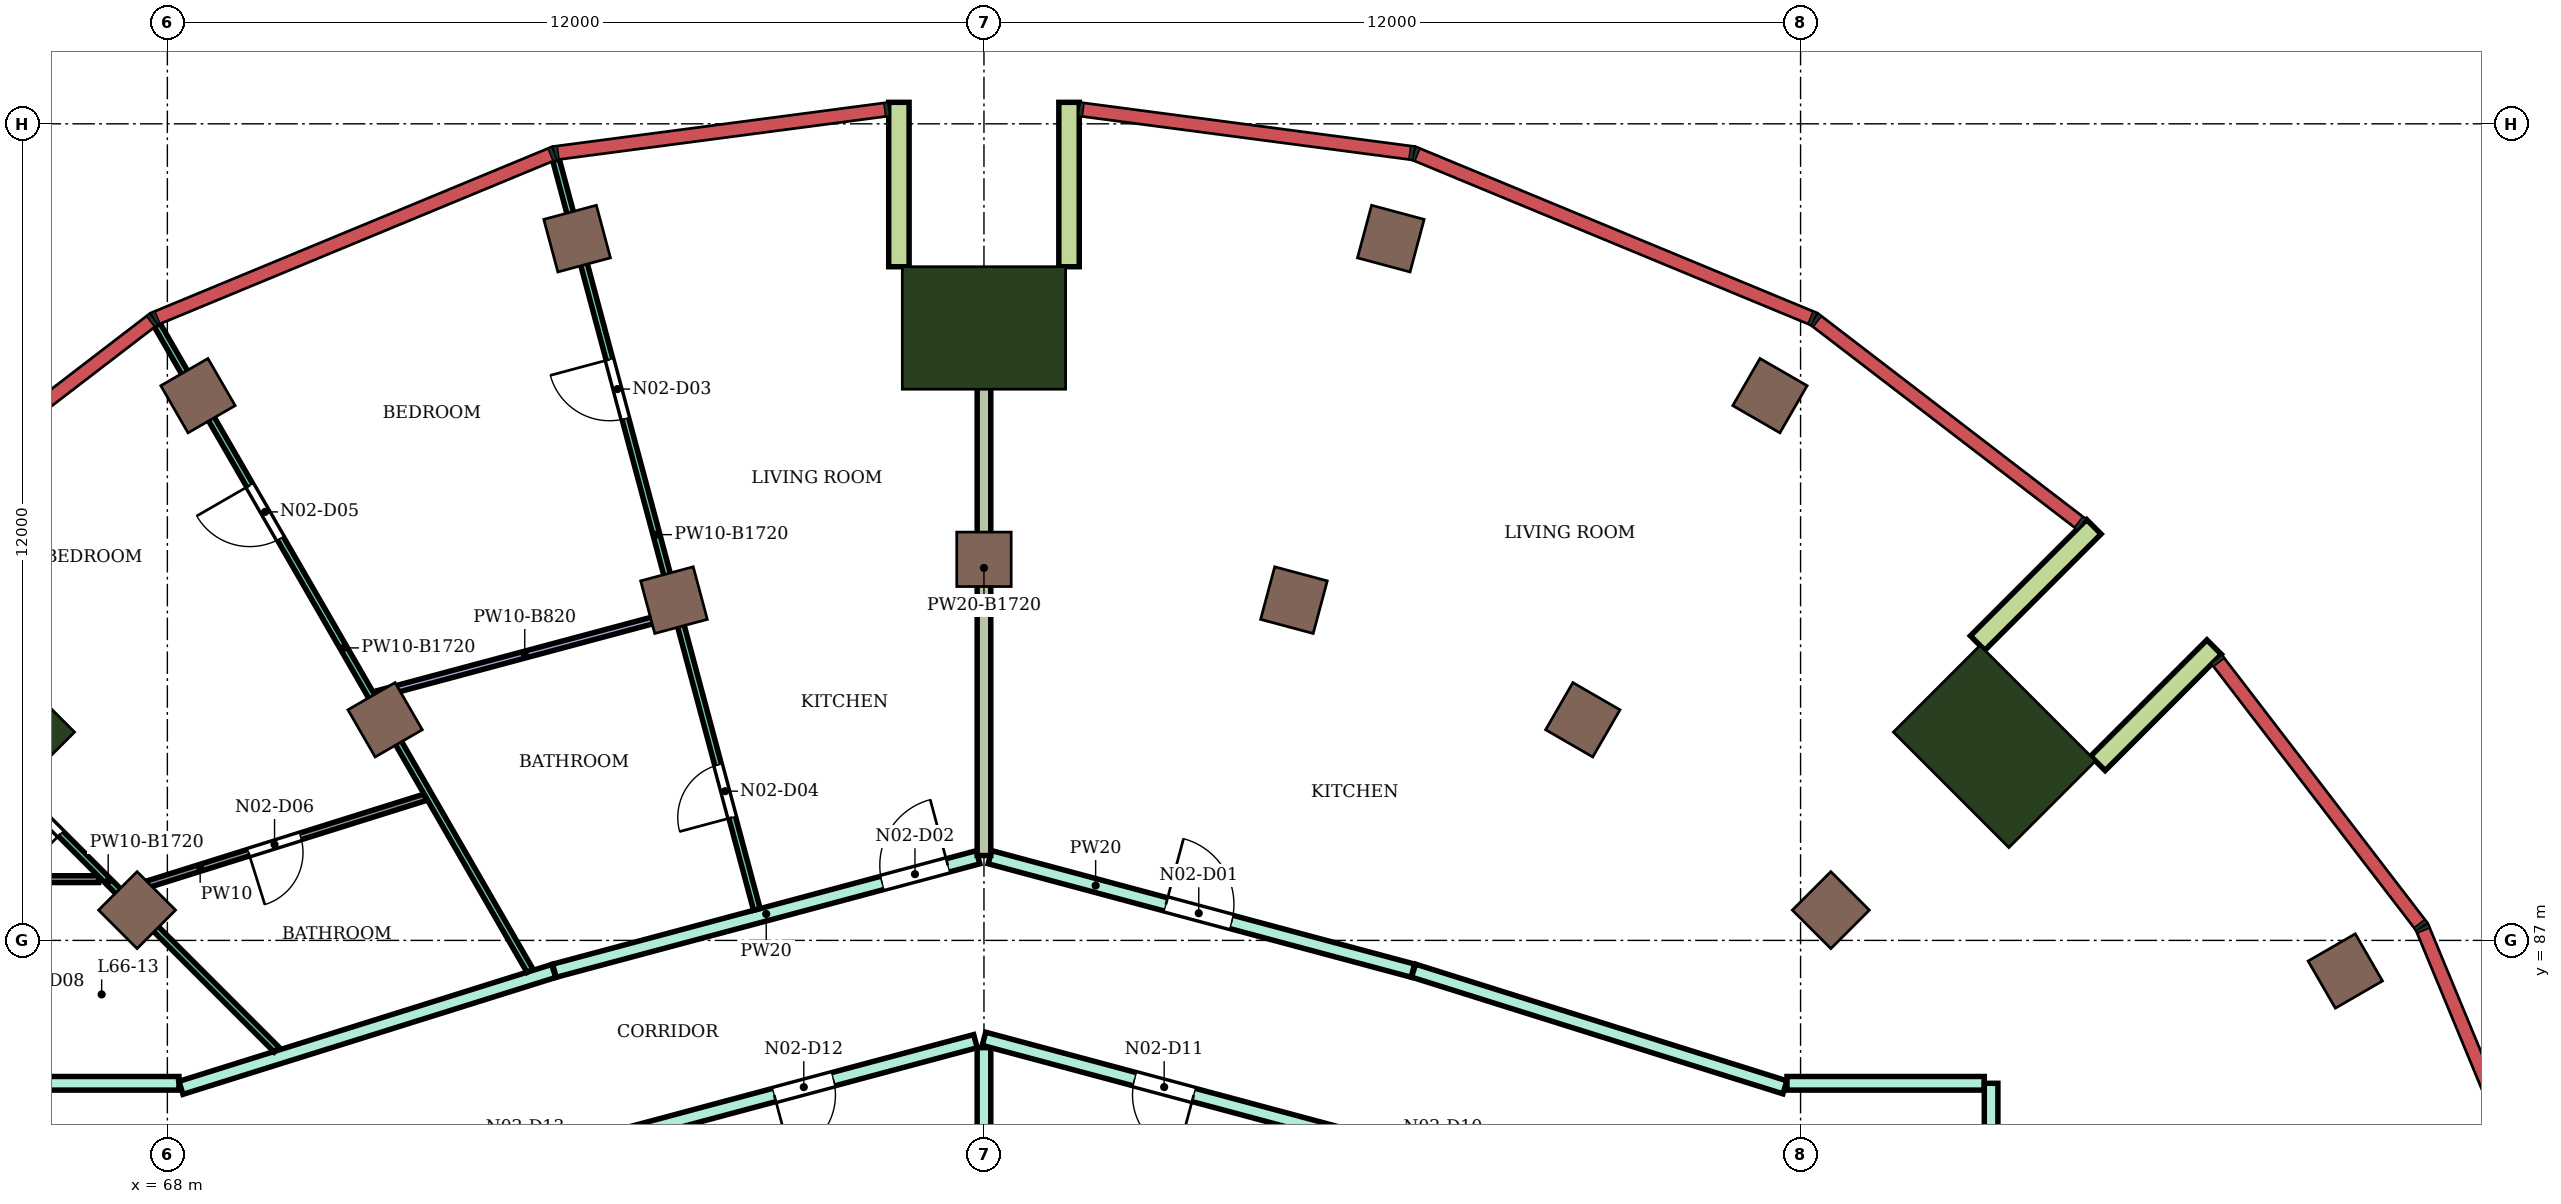
"""IFC4 building model, lengths in metres.
Left out: names, types, materials, properties, quantities, classifications, styles, units other than length and angle.
Written with IfcOpenShell. Run it as: python <this file> out.ifc"""

import sys

from ifc_helpers import new_model, si_unit, direction, frame, frame_2d, origin, origin_2d, place, context, subcontext, project, spatial, rectangle, extrude, element, fill, save


model = new_model("IFC4")
c1 = context("Model", 3, precision=1e-05, world=origin(), true_north=direction((0.0, 1.0)))
c2 = subcontext(c1, "Body", "Model", "MODEL_VIEW")
j1 = project(units=[si_unit("LENGTHUNIT", "METRE"), si_unit("PLANEANGLEUNIT", "RADIAN")], contexts=[c1])
p1 = place(None, origin())
s1 = spatial("IfcSite", under=j1, at=p1, CompositionType="ELEMENT")
p2 = place(p1, origin())
s2 = spatial("IfcBuilding", under=s1, at=p2, CompositionType="ELEMENT")
p3 = place(p2, frame((0.0, 0.0, 288.3)))
s3 = spatial("IfcBuildingStorey", under=s2, at=p3, CompositionType="ELEMENT", Elevation=288.3)
for number, where, z_axis, x_axis in (
    (1, (100.005, 86.55, 0.0), (0.0, 0.0, 1.0), (0.866, 0.5, 0.0)),
    (2, (91.55, 95.005, 0.0), (0.0, 0.0, 1.0), (0.5, 0.866, 0.0)),
    (3, (85.979, 97.313, 0.0), (0.0, 0.0, 1.0), (0.259, 0.966, 0.0)),
    (4, (74.021, 97.313, 0.0), (0.0, 0.0, 1.0), (-0.259, 0.966, 0.0)),
    (5, (68.45, 95.005, 0.0), (0.0, 0.0, 1.0), (-0.5, 0.866, 0.0)),
    (6, (92.445, 87.445, 0.0), (0.0, 0.0, 1.0), (0.707, 0.707, 0.0)),
    (7, (88.8, 90.242, 0.0), (0.0, 0.0, 1.0), (0.5, 0.866, 0.0)),
    (8, (84.555, 92.0, 0.0), (0.0, 0.0, 1.0), (0.259, 0.966, 0.0)),
    (9, (80.0, 92.6, 0.0), (0.0, 0.0, 1.0), (0.0, 1.0, 0.0)),
    (10, (75.445, 92.0, 0.0), (0.0, 0.0, 1.0), (-0.259, 0.966, 0.0)),
    (11, (71.2, 90.242, 0.0), (0.0, 0.0, 1.0), (-0.5, 0.866, 0.0)),
    (12, (67.555, 87.445, 0.0), (0.0, 0.0, 1.0), (-0.707, 0.707, 0.0)),
):
    element("IfcColumn", number, at=place(p3, frame(where, z_axis=z_axis, x_axis=x_axis)), inside=s3, PredefinedType="COLUMN", context=c2, shape_type="SweptSolid", body=[
        extrude(rectangle(XDim=0.8, YDim=0.8, at=origin_2d()), origin(), (0.0, 0.0, 1.0), 4.2),
    ])
for number, where, z_axis, x_axis in (
    (13, (94.849, 89.849, 0.0), (0.0, 0.0, 1.0), (0.707, 0.707, 0.0)),
    (14, (80.0, 96.0, 0.0), (0.0, 0.0, 1.0), (0.0, 1.0, 0.0)),
    (15, (65.151, 89.849, 0.0), (0.0, 0.0, 1.0), (-0.707, 0.707, 0.0)),
):
    element("IfcColumn", number, at=place(p3, frame(where, z_axis=z_axis, x_axis=x_axis)), inside=s3, PredefinedType="COLUMN", context=c2, shape_type="SweptSolid", body=[
        extrude(rectangle(XDim=1.8, YDim=2.4, at=origin_2d()), origin(), (0.0, 0.0, 1.0), 4.2),
    ])
for number, where, z_axis, x_axis in (
    (16, (96.37, 89.602, 0.0), (0.0, 0.0, 1.0), (0.707, 0.707, 0.0)),
    (17, (94.602, 91.37, 0.0), (0.0, 0.0, 1.0), (0.707, 0.707, 0.0)),
):
    element("IfcWall", number, at=place(p3, frame(where, z_axis=z_axis, x_axis=x_axis)), inside=s3, PredefinedType="NOTDEFINED", context=c2, shape_type="SweptSolid", body=[
        extrude(rectangle(XDim=2.416, YDim=0.3, at=frame_2d((1.208, 0.0))), origin(), (0.0, 0.0, 1.0), 4.2),
    ])
for number, where, z_axis, x_axis in (
    (18, (81.25, 96.9, 0.0), (0.0, 0.0, 1.0), (0.0, 1.0, 0.0)),
    (19, (78.75, 96.9, 0.0), (0.0, 0.0, 1.0), (0.0, 1.0, 0.0)),
):
    element("IfcWall", number, at=place(p3, frame(where, z_axis=z_axis, x_axis=x_axis)), inside=s3, PredefinedType="NOTDEFINED", context=c2, shape_type="SweptSolid", body=[
        extrude(rectangle(XDim=2.416, YDim=0.3, at=frame_2d((1.208, 0.0))), origin(), (0.0, 0.0, 1.0), 4.2),
    ])
p4 = place(p3, frame((65.2, 84.9, 0.0), z_axis=(0.0, 0.0, 1.0), x_axis=(1.0, 0.0, 0.0)))
e20 = element("IfcWall", 20, at=p4, inside=s3, PredefinedType="PARTITIONING", context=c2, shape_type="SweptSolid", body=[
    extrude(rectangle(XDim=2.97, YDim=0.2, at=frame_2d((1.485, 0.0))), origin(), (0.0, 0.0, 1.0), 3.75),
])
p5 = place(p3, frame((68.2, 84.833, 0.0), z_axis=(0.0, 0.0, 1.0), x_axis=(0.954191968402, 0.299195065863, 0.0)))
e21 = element("IfcWall", 21, at=p5, inside=s3, PredefinedType="PARTITIONING", context=c2, shape_type="SweptSolid", body=[
    extrude(rectangle(XDim=5.74, YDim=0.2, at=frame_2d((2.87, 0.0))), origin(), (0.0, 0.0, 1.0), 3.75),
])
p6 = place(p3, frame((73.687, 86.554, 0.0), z_axis=(0.0, 0.0, 1.0), x_axis=(0.96595903825, 0.258695064551, 0.0)))
e22 = element("IfcWall", 22, at=p6, inside=s3, PredefinedType="PARTITIONING", context=c2, shape_type="SweptSolid", body=[
    extrude(rectangle(XDim=6.446, YDim=0.2, at=frame_2d((3.223, 0.0))), origin(), (0.0, 0.0, 1.0), 3.75),
])
p7 = place(p6, frame((4.986, 0.0, 0.0)))
e23 = element("IfcOpeningElement", 23, at=p7, cuts=e22, PredefinedType="OPENING", context=c2, shape_type="SweptSolid", body=[
    extrude(rectangle(XDim=1.0, YDim=2.1, at=frame_2d((0.5, 1.05))), frame((0.0, 0.11, 0.0), z_axis=(0.0, -1.0, 0.0), x_axis=(1.0, 0.0, 0.0)), (0.0, 0.0, 1.0), 0.22),
])
p8 = place(p3, frame((74.413, 84.057, 0.0), z_axis=(0.0, 0.0, 1.0), x_axis=(0.965972135939, 0.258646153246, 0.0)))
e24 = element("IfcWall", 24, at=p8, inside=s3, PredefinedType="PARTITIONING", context=c2, shape_type="SweptSolid", body=[
    extrude(rectangle(XDim=5.654, YDim=0.2, at=frame_2d((2.827, 0.0))), origin(), (0.0, 0.0, 1.0), 3.75),
])
p9 = place(p8, frame((2.593, 0.0, 0.0)))
e25 = element("IfcOpeningElement", 25, at=p9, cuts=e24, PredefinedType="OPENING", context=c2, shape_type="SweptSolid", body=[
    extrude(rectangle(XDim=0.9, YDim=2.1, at=frame_2d((0.45, 1.05))), frame((0.0, 0.11, 0.0), z_axis=(0.0, -1.0, 0.0), x_axis=(1.0, 0.0, 0.0)), (0.0, 0.0, 1.0), 0.22),
])
p10 = place(p3, frame((80.0, 82.699, 0.0), z_axis=(0.0, 0.0, 1.0), x_axis=(0.0, 1.0, 0.0)))
e26 = element("IfcWall", 26, at=p10, inside=s3, PredefinedType="PARTITIONING", context=c2, shape_type="SweptSolid", body=[
    extrude(rectangle(XDim=2.725, YDim=0.2, at=frame_2d((1.363, 0.0))), origin(), (0.0, 0.0, 1.0), 3.75),
])
p11 = place(p3, frame((80.0, 85.554, 0.0), z_axis=(0.0, 0.0, 1.0), x_axis=(0.965928989968, -0.258807237802, 0.0)))
e27 = element("IfcWall", 27, at=p11, inside=s3, PredefinedType="PARTITIONING", context=c2, shape_type="SweptSolid", body=[
    extrude(rectangle(XDim=5.774, YDim=0.2, at=frame_2d((2.887, 0.0))), origin(), (0.0, 0.0, 1.0), 3.75),
])
p12 = place(p11, frame((2.292, 0.0, 0.0)))
e28 = element("IfcOpeningElement", 28, at=p12, cuts=e27, PredefinedType="OPENING", context=c2, shape_type="SweptSolid", body=[
    extrude(rectangle(XDim=0.9, YDim=2.1, at=frame_2d((0.45, 1.05))), frame((0.0, 0.11, 0.0), z_axis=(0.0, -1.0, 0.0), x_axis=(1.0, 0.0, 0.0)), (0.0, 0.0, 1.0), 0.22),
])
p13 = place(p3, frame((80.087, 88.223, 0.0), z_axis=(0.0, 0.0, 1.0), x_axis=(0.965852330757, -0.25909317855, 0.0)))
e29 = element("IfcWall", 29, at=p13, inside=s3, PredefinedType="PARTITIONING", context=c2, shape_type="SweptSolid", body=[
    extrude(rectangle(XDim=6.436, YDim=0.2, at=frame_2d((3.218, 0.0))), origin(), (0.0, 0.0, 1.0), 3.75),
])
p14 = place(p13, frame((2.678, 0.0, 0.0)))
e30 = element("IfcOpeningElement", 30, at=p14, cuts=e29, PredefinedType="OPENING", context=c2, shape_type="SweptSolid", body=[
    extrude(rectangle(XDim=1.0, YDim=2.1, at=frame_2d((0.5, 1.05))), frame((0.0, 0.11, 0.0), z_axis=(0.0, -1.0, 0.0), x_axis=(1.0, 0.0, 0.0)), (0.0, 0.0, 1.0), 0.22),
])
p15 = place(p3, frame((80.0, 88.247, 0.0), z_axis=(0.0, 0.0, 1.0), x_axis=(0.0, 1.0, 0.0)))
e31 = element("IfcWall", 31, at=p15, inside=s3, PredefinedType="PARTITIONING", context=c2, shape_type="SweptSolid", body=[
    extrude(rectangle(XDim=8.452, YDim=0.2, at=frame_2d((4.226, 0.0))), origin(), (0.0, 0.0, 1.0), 2.48),
])
p16 = place(p3, frame((86.313, 86.555, 0.0), z_axis=(0.0, 0.0, 1.0), x_axis=(0.9540216201, -0.299737799389, 0.0)))
e32 = element("IfcWall", 32, at=p16, inside=s3, PredefinedType="PARTITIONING", context=c2, shape_type="SweptSolid", body=[
    extrude(rectangle(XDim=5.719, YDim=0.2, at=frame_2d((2.86, 0.0))), origin(), (0.0, 0.0, 1.0), 3.75),
])
p17 = place(p3, frame((91.8, 84.9, 0.0), z_axis=(0.0, 0.0, 1.0), x_axis=(1.0, 0.0, 0.0)))
e33 = element("IfcWall", 33, at=p17, inside=s3, PredefinedType="PARTITIONING", context=c2, shape_type="SweptSolid", body=[
    extrude(rectangle(XDim=2.9, YDim=0.2, at=frame_2d((1.45, 0.0))), origin(), (0.0, 0.0, 1.0), 3.75),
])
p18 = place(p3, frame((94.8, 83.577, 0.0), z_axis=(0.0, 0.0, 1.0), x_axis=(0.0, 1.0, 0.0)))
e34 = element("IfcWall", 34, at=p18, inside=s3, PredefinedType="PARTITIONING", context=c2, shape_type="SweptSolid", body=[
    extrude(rectangle(XDim=1.323, YDim=0.2, at=frame_2d((0.662, 0.0))), origin(), (0.0, 0.0, 1.0), 3.75),
])
p19 = place(p3, frame((59.486, 87.9, 0.0), z_axis=(0.0, 0.0, 1.0), x_axis=(1.0, 0.0, 0.0)))
e35 = element("IfcWall", 35, at=p19, inside=s3, PredefinedType="PARTITIONING", context=c2, shape_type="SweptSolid", body=[
    extrude(rectangle(XDim=7.504, YDim=0.1, at=frame_2d((3.752, 0.0))), origin(), (0.0, 0.0, 1.0), 3.75),
])
p20 = place(p19, frame((2.622, 0.0, 0.0)))
e36 = element("IfcOpeningElement", 36, at=p20, cuts=e35, PredefinedType="OPENING", context=c2, shape_type="SweptSolid", body=[
    extrude(rectangle(XDim=0.8, YDim=2.1, at=frame_2d((0.4, 1.05))), frame((0.0, 0.06, 0.0), z_axis=(0.0, -1.0, 0.0), x_axis=(1.0, 0.0, 0.0)), (0.0, 0.0, 1.0), 0.12),
])
p21 = place(p3, frame((64.656, 90.344, 0.0), z_axis=(0.0, 0.0, 1.0), x_axis=(0.707106781187, -0.707106781187, 0.0)))
e37 = element("IfcWall", 37, at=p21, inside=s3, PredefinedType="PARTITIONING", context=c2, shape_type="SweptSolid", body=[
    extrude(rectangle(XDim=7.0, YDim=0.1, at=frame_2d((3.5, 0.0))), origin(), (0.0, 0.0, 1.0), 2.48),
])
p22 = place(p21, frame((1.613, 0.0, 0.0)))
e38 = element("IfcOpeningElement", 38, at=p22, cuts=e37, PredefinedType="OPENING", context=c2, shape_type="SweptSolid", body=[
    extrude(rectangle(XDim=0.9, YDim=2.1, at=frame_2d((0.45, 1.05))), frame((0.0, 0.06, 0.0), z_axis=(0.0, -1.0, 0.0), x_axis=(1.0, 0.0, 0.0)), (0.0, 0.0, 1.0), 0.12),
])
p23 = place(p3, frame((67.379, 87.721, 0.0), z_axis=(0.0, 0.0, 1.0), x_axis=(0.954243762736, 0.299029833426, 0.0)))
e39 = element("IfcWall", 39, at=p23, inside=s3, PredefinedType="PARTITIONING", context=c2, shape_type="SweptSolid", body=[
    extrude(rectangle(XDim=4.622, YDim=0.1, at=frame_2d((2.311, 0.0))), origin(), (0.0, 0.0, 1.0), 3.75),
])
p24 = place(p23, frame((1.901, 0.0, 0.0)))
e40 = element("IfcOpeningElement", 40, at=p24, cuts=e39, PredefinedType="OPENING", context=c2, shape_type="SweptSolid", body=[
    extrude(rectangle(XDim=0.8, YDim=2.1, at=frame_2d((0.4, 1.05))), frame((0.0, 0.06, 0.0), z_axis=(0.0, -1.0, 0.0), x_axis=(1.0, 0.0, 0.0)), (0.0, 0.0, 1.0), 0.12),
])
p25 = place(p3, frame((67.851, 96.042, 0.0), z_axis=(0.0, 0.0, 1.0), x_axis=(0.499990581918, -0.866030841248, 0.0)))
e41 = element("IfcWall", 41, at=p25, inside=s3, PredefinedType="PARTITIONING", context=c2, shape_type="SweptSolid", body=[
    extrude(rectangle(XDim=10.956, YDim=0.1, at=frame_2d((5.478, 0.0))), origin(), (0.0, 0.0, 1.0), 2.48),
])
p26 = place(p25, frame((2.72, 0.0, 0.0)))
e42 = element("IfcOpeningElement", 42, at=p26, cuts=e41, PredefinedType="OPENING", context=c2, shape_type="SweptSolid", body=[
    extrude(rectangle(XDim=0.9, YDim=2.1, at=frame_2d((0.45, 1.05))), frame((0.0, 0.06, 0.0), z_axis=(0.0, -1.0, 0.0), x_axis=(1.0, 0.0, 0.0)), (0.0, 0.0, 1.0), 0.12),
])
p27 = place(p3, frame((71.054, 90.611, 0.0), z_axis=(0.0, 0.0, 1.0), x_axis=(0.965944938819, 0.258747705633, 0.0)))
e43 = element("IfcWall", 43, at=p27, inside=s3, PredefinedType="PARTITIONING", context=c2, shape_type="SweptSolid", body=[
    extrude(rectangle(XDim=4.551, YDim=0.1, at=frame_2d((2.275, 0.0))), origin(), (0.0, 0.0, 1.0), 3.38),
])
p28 = place(p3, frame((73.711, 98.47, 0.0), z_axis=(0.0, 0.0, 1.0), x_axis=(0.258792445142, -0.965932953335, 0.0)))
e44 = element("IfcWall", 44, at=p28, inside=s3, PredefinedType="PARTITIONING", context=c2, shape_type="SweptSolid", body=[
    extrude(rectangle(XDim=11.404, YDim=0.1, at=frame_2d((5.702, 0.0))), origin(), (0.0, 0.0, 1.0), 2.48),
])
p29 = place(p28, frame((3.037, 0.0, 0.0)))
e45 = element("IfcOpeningElement", 45, at=p29, cuts=e44, PredefinedType="OPENING", context=c2, shape_type="SweptSolid", body=[
    extrude(rectangle(XDim=0.9, YDim=2.1, at=frame_2d((0.45, 1.05))), frame((0.0, 0.06, 0.0), z_axis=(0.0, -1.0, 0.0), x_axis=(1.0, 0.0, 0.0)), (0.0, 0.0, 1.0), 0.12),
])
p30 = place(p28, frame((9.205, 0.0, 0.0)))
e46 = element("IfcOpeningElement", 46, at=p30, cuts=e44, PredefinedType="OPENING", context=c2, shape_type="SweptSolid", body=[
    extrude(rectangle(XDim=0.8, YDim=2.1, at=frame_2d((0.4, 1.05))), frame((0.0, 0.06, 0.0), z_axis=(0.0, -1.0, 0.0), x_axis=(1.0, 0.0, 0.0)), (0.0, 0.0, 1.0), 0.12),
])
p31 = place(p14, origin())
e47 = element("IfcDoor", 47, at=p31, inside=s3, OperationType="SINGLE_SWING_LEFT", PredefinedType="DOOR", context=c2, shape_type="SweptSolid", body=[
    extrude(rectangle(XDim=1.0, YDim=2.1, at=frame_2d((0.5, 1.05))), frame((0.0, 0.025, 0.0), z_axis=(0.0, -1.0, 0.0), x_axis=(1.0, 0.0, 0.0)), (0.0, 0.0, 1.0), 0.05),
])
fill(e30, e47)
p32 = place(p7, origin())
e48 = element("IfcDoor", 48, at=p32, inside=s3, OperationType="SINGLE_SWING_RIGHT", PredefinedType="DOOR", context=c2, shape_type="SweptSolid", body=[
    extrude(rectangle(XDim=1.0, YDim=2.1, at=frame_2d((0.5, 1.05))), frame((0.0, 0.025, 0.0), z_axis=(0.0, -1.0, 0.0), x_axis=(1.0, 0.0, 0.0)), (0.0, 0.0, 1.0), 0.05),
])
fill(e23, e48)
p33 = place(p29, frame((0.9, 0.0, 0.0), z_axis=(0.0, 0.0, 1.0), x_axis=(-1.0, 0.0, 0.0)))
e49 = element("IfcDoor", 49, at=p33, inside=s3, OperationType="SINGLE_SWING_RIGHT", PredefinedType="DOOR", context=c2, shape_type="SweptSolid", body=[
    extrude(rectangle(XDim=0.9, YDim=2.1, at=frame_2d((0.45, 1.05))), frame((0.0, 0.025, 0.0), z_axis=(0.0, -1.0, 0.0), x_axis=(1.0, 0.0, 0.0)), (0.0, 0.0, 1.0), 0.05),
])
fill(e45, e49)
p34 = place(p30, frame((0.8, 0.0, 0.0), z_axis=(0.0, 0.0, 1.0), x_axis=(-1.0, 0.0, 0.0)))
e50 = element("IfcDoor", 50, at=p34, inside=s3, OperationType="SINGLE_SWING_LEFT", PredefinedType="DOOR", context=c2, shape_type="SweptSolid", body=[
    extrude(rectangle(XDim=0.8, YDim=2.1, at=frame_2d((0.4, 1.05))), frame((0.0, 0.025, 0.0), z_axis=(0.0, -1.0, 0.0), x_axis=(1.0, 0.0, 0.0)), (0.0, 0.0, 1.0), 0.05),
])
fill(e46, e50)
p35 = place(p26, frame((0.9, 0.0, 0.0), z_axis=(0.0, 0.0, 1.0), x_axis=(-1.0, 0.0, 0.0)))
e51 = element("IfcDoor", 51, at=p35, inside=s3, OperationType="SINGLE_SWING_RIGHT", PredefinedType="DOOR", context=c2, shape_type="SweptSolid", body=[
    extrude(rectangle(XDim=0.9, YDim=2.1, at=frame_2d((0.45, 1.05))), frame((0.0, 0.025, 0.0), z_axis=(0.0, -1.0, 0.0), x_axis=(1.0, 0.0, 0.0)), (0.0, 0.0, 1.0), 0.05),
])
fill(e42, e51)
p36 = place(p24, frame((0.8, 0.0, 0.0), z_axis=(0.0, 0.0, 1.0), x_axis=(-1.0, 0.0, 0.0)))
e52 = element("IfcDoor", 52, at=p36, inside=s3, OperationType="SINGLE_SWING_RIGHT", PredefinedType="DOOR", context=c2, shape_type="SweptSolid", body=[
    extrude(rectangle(XDim=0.8, YDim=2.1, at=frame_2d((0.4, 1.05))), frame((0.0, 0.025, 0.0), z_axis=(0.0, -1.0, 0.0), x_axis=(1.0, 0.0, 0.0)), (0.0, 0.0, 1.0), 0.05),
])
fill(e40, e52)
p37 = place(p22, frame((0.9, 0.0, 0.0), z_axis=(0.0, 0.0, 1.0), x_axis=(-1.0, 0.0, 0.0)))
e53 = element("IfcDoor", 53, at=p37, inside=s3, OperationType="SINGLE_SWING_LEFT", PredefinedType="DOOR", context=c2, shape_type="SweptSolid", body=[
    extrude(rectangle(XDim=0.9, YDim=2.1, at=frame_2d((0.45, 1.05))), frame((0.0, 0.025, 0.0), z_axis=(0.0, -1.0, 0.0), x_axis=(1.0, 0.0, 0.0)), (0.0, 0.0, 1.0), 0.05),
])
fill(e38, e53)
p38 = place(p12, frame((0.9, 0.0, 0.0), z_axis=(0.0, 0.0, 1.0), x_axis=(-1.0, 0.0, 0.0)))
e54 = element("IfcDoor", 54, at=p38, inside=s3, OperationType="SINGLE_SWING_LEFT", PredefinedType="DOOR", context=c2, shape_type="SweptSolid", body=[
    extrude(rectangle(XDim=0.9, YDim=2.1, at=frame_2d((0.45, 1.05))), frame((0.0, 0.025, 0.0), z_axis=(0.0, -1.0, 0.0), x_axis=(1.0, 0.0, 0.0)), (0.0, 0.0, 1.0), 0.05),
])
fill(e28, e54)
p39 = place(p9, frame((0.9, 0.0, 0.0), z_axis=(0.0, 0.0, 1.0), x_axis=(-1.0, 0.0, 0.0)))
e55 = element("IfcDoor", 55, at=p39, inside=s3, OperationType="SINGLE_SWING_RIGHT", PredefinedType="DOOR", context=c2, shape_type="SweptSolid", body=[
    extrude(rectangle(XDim=0.9, YDim=2.1, at=frame_2d((0.45, 1.05))), frame((0.0, 0.025, 0.0), z_axis=(0.0, -1.0, 0.0), x_axis=(1.0, 0.0, 0.0)), (0.0, 0.0, 1.0), 0.05),
])
fill(e25, e55)
save(model, sys.argv[1])
